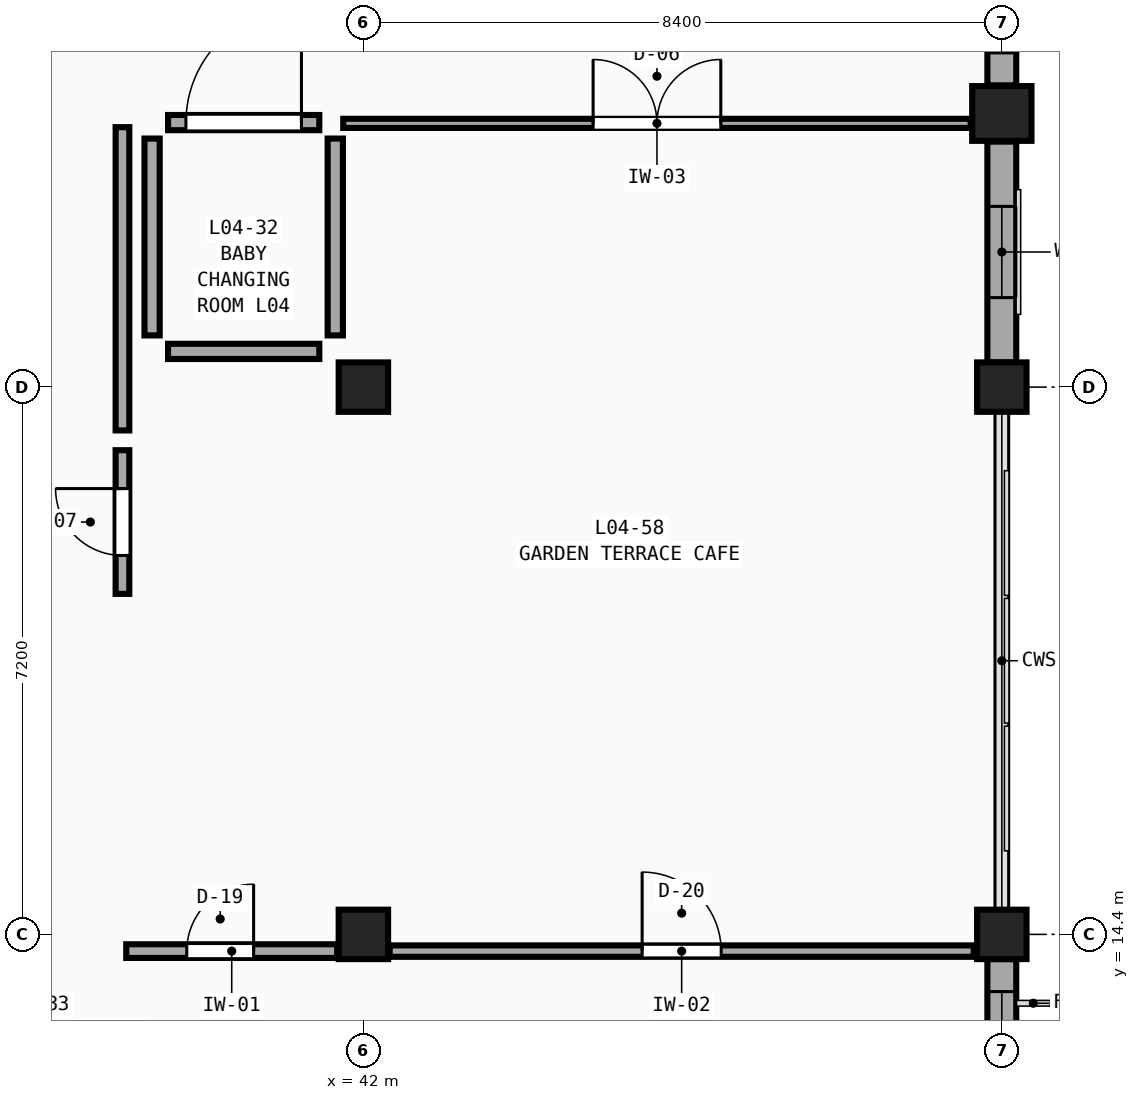
"""IFC4 building model, lengths in metres.
Left out: names, types, materials, properties, quantities, classifications, styles, units other than length and angle.
Written with IfcOpenShell. Run it as: python <this file> out.ifc"""

import sys

from ifc_helpers import new_model, si_unit, direction, frame, frame_2d, origin, origin_2d, place, context, subcontext, project, spatial, rectangle, extrude, element, fill, save


model = new_model("IFC4")
c1 = context("Model", 3, precision=1e-05, world=origin(), true_north=direction((0.0, 1.0)))
c2 = subcontext(c1, "Body", "Model", "MODEL_VIEW")
j1 = project(units=[si_unit("LENGTHUNIT", "METRE"), si_unit("PLANEANGLEUNIT", "RADIAN")], contexts=[c1])
p1 = place(None, origin())
s1 = spatial("IfcSite", under=j1, at=p1, CompositionType="ELEMENT")
p2 = place(p1, origin())
s2 = spatial("IfcBuilding", under=s1, at=p2, CompositionType="ELEMENT")
p3 = place(p2, frame((0.0, 0.0, 18.9)))
s3 = spatial("IfcBuildingStorey", under=s2, at=p3, CompositionType="ELEMENT", Elevation=18.9)
for number, where, z_axis, x_axis in (
    (1, (42.0, 14.4, 0.0), (0.0, 0.0, 1.0), (1.0, 0.0, 0.0)),
    (2, (42.0, 21.6, 0.0), (0.0, 0.0, 1.0), (1.0, 0.0, 0.0)),
    (3, (50.4, 14.4, 0.0), (0.0, 0.0, 1.0), (1.0, 0.0, 0.0)),
    (4, (50.4, 21.6, 0.0), (0.0, 0.0, 1.0), (1.0, 0.0, 0.0)),
):
    element("IfcColumn", number, at=place(p3, frame(where, z_axis=z_axis, x_axis=x_axis)), inside=s3, PredefinedType="COLUMN", context=c2, shape_type="SweptSolid", body=[
        extrude(rectangle(XDim=0.65, YDim=0.65, at=origin_2d()), origin(), (0.0, 0.0, 1.0), 4.5),
    ])
p4 = place(p3, frame((50.4, 25.2, 0.0), z_axis=(0.0, 0.0, 1.0), x_axis=(1.0, 0.0, 0.0)))
e5 = element("IfcColumn", 5, at=p4, inside=s3, PredefinedType="PILASTER", context=c2, shape_type="SweptSolid", body=[
    extrude(rectangle(XDim=0.78, YDim=0.72, at=origin_2d()), origin(), (0.0, 0.0, 1.0), 4.5),
])
p5 = place(p3, frame((50.4, 14.075, 0.0), z_axis=(0.0, 0.0, 1.0), x_axis=(0.0, -1.0, 0.0)))
e6 = element("IfcWall", 6, at=p5, inside=s3, PredefinedType="SOLIDWALL", context=c2, shape_type="SweptSolid", body=[
    extrude(rectangle(XDim=2.905, YDim=0.38, at=frame_2d((1.453, 0.0))), origin(), (0.0, 0.0, 1.0), 3.63),
])
p6 = place(p5, frame((0.427, 0.0, 0.75)))
e7 = element("IfcOpeningElement", 7, at=p6, cuts=e6, PredefinedType="OPENING", context=c2, shape_type="SweptSolid", body=[
    extrude(rectangle(XDim=2.05, YDim=2.08, at=frame_2d((1.025, 1.04))), frame((0.0, 0.21, 0.0), z_axis=(0.0, -1.0, 0.0), x_axis=(1.0, 0.0, 0.0)), (0.0, 0.0, 1.0), 0.42),
])
p7 = place(p3, frame((50.4, 28.475, 0.0), z_axis=(0.0, 0.0, 1.0), x_axis=(0.0, -1.0, 0.0)))
e8 = element("IfcWall", 8, at=p7, inside=s3, PredefinedType="SOLIDWALL", context=c2, shape_type="SweptSolid", body=[
    extrude(rectangle(XDim=2.905, YDim=0.38, at=frame_2d((1.453, 0.0))), origin(), (0.0, 0.0, 1.0), 3.63),
])
p8 = place(p7, frame((0.427, 0.0, 0.75)))
e9 = element("IfcOpeningElement", 9, at=p8, cuts=e8, PredefinedType="OPENING", context=c2, shape_type="SweptSolid", body=[
    extrude(rectangle(XDim=2.05, YDim=2.08, at=frame_2d((1.025, 1.04))), frame((0.0, 0.21, 0.0), z_axis=(0.0, -1.0, 0.0), x_axis=(1.0, 0.0, 0.0)), (0.0, 0.0, 1.0), 0.42),
])
p9 = place(p3, frame((50.4, 24.83, 0.0), z_axis=(0.0, 0.0, 1.0), x_axis=(0.0, -1.0, 0.0)))
e10 = element("IfcWall", 10, at=p9, inside=s3, PredefinedType="SOLIDWALL", context=c2, shape_type="SweptSolid", body=[
    extrude(rectangle(XDim=2.905, YDim=0.38, at=frame_2d((1.453, 0.0))), origin(), (0.0, 0.0, 1.0), 3.63),
])
p10 = place(p9, frame((0.853, 0.0, 0.75)))
e11 = element("IfcOpeningElement", 11, at=p10, cuts=e10, PredefinedType="OPENING", context=c2, shape_type="SweptSolid", body=[
    extrude(rectangle(XDim=1.2, YDim=2.26, at=frame_2d((0.6, 1.13))), frame((0.0, 0.21, 0.0), z_axis=(0.0, -1.0, 0.0), x_axis=(1.0, 0.0, 0.0)), (0.0, 0.0, 1.0), 0.42),
])
p11 = place(p3, frame((38.88, 14.18, 0.0), z_axis=(0.0, 0.0, 1.0), x_axis=(1.0, 0.0, 0.0)))
e12 = element("IfcWall", 12, at=p11, inside=s3, PredefinedType="PARTITIONING", context=c2, shape_type="SweptSolid", body=[
    extrude(rectangle(XDim=2.775, YDim=0.18, at=frame_2d((1.388, 0.0))), origin(), (0.0, 0.0, 1.0), 3.73),
])
p12 = place(p11, frame((0.796, 0.0, 0.0)))
e13 = element("IfcOpeningElement", 13, at=p12, cuts=e12, PredefinedType="OPENING", context=c2, shape_type="SweptSolid", body=[
    extrude(rectangle(XDim=0.88, YDim=2.29, at=frame_2d((0.44, 1.145))), frame((0.0, 0.11, 0.0), z_axis=(0.0, -1.0, 0.0), x_axis=(1.0, 0.0, 0.0)), (0.0, 0.0, 1.0), 0.22),
])
p13 = place(p3, frame((42.345, 14.18, 0.0), z_axis=(0.0, 0.0, 1.0), x_axis=(1.0, 0.0, 0.0)))
e14 = element("IfcWall", 14, at=p13, inside=s3, PredefinedType="PARTITIONING", context=c2, shape_type="SweptSolid", body=[
    extrude(rectangle(XDim=7.685, YDim=0.15, at=frame_2d((3.843, 0.0))), origin(), (0.0, 0.0, 1.0), 3.73),
])
p14 = place(p13, frame((3.323, 0.0, 0.0)))
e15 = element("IfcOpeningElement", 15, at=p14, cuts=e14, PredefinedType="OPENING", context=c2, shape_type="SweptSolid", body=[
    extrude(rectangle(XDim=1.04, YDim=2.29, at=frame_2d((0.52, 1.145))), frame((0.0, 0.095, 0.0), z_axis=(0.0, -1.0, 0.0), x_axis=(1.0, 0.0, 0.0)), (0.0, 0.0, 1.0), 0.19),
])
p15 = place(p3, frame((41.735, 25.07, 0.0), z_axis=(0.0, 0.0, 1.0), x_axis=(1.0, 0.0, 0.0)))
e16 = element("IfcWall", 16, at=p15, inside=s3, PredefinedType="PARTITIONING", context=c2, shape_type="SweptSolid", body=[
    extrude(rectangle(XDim=8.255, YDim=0.12, at=frame_2d((4.127, 0.0))), origin(), (0.0, 0.0, 1.0), 4.18),
])
p16 = place(p15, frame((3.288, 0.0, 0.0)))
e17 = element("IfcOpeningElement", 17, at=p16, cuts=e16, PredefinedType="OPENING", context=c2, shape_type="SweptSolid", body=[
    extrude(rectangle(XDim=1.68, YDim=2.05, at=frame_2d((0.84, 1.025))), frame((0.0, 0.08, 0.0), z_axis=(0.0, -1.0, 0.0), x_axis=(1.0, 0.0, 0.0)), (0.0, 0.0, 1.0), 0.16),
])
p17 = place(p3, frame((38.83, 21.03, 0.0), z_axis=(0.0, 0.0, 1.0), x_axis=(0.0, 1.0, 0.0)))
e18 = element("IfcWall", 18, at=p17, inside=s3, PredefinedType="PARTITIONING", context=c2, shape_type="SweptSolid", body=[
    extrude(rectangle(XDim=3.99, YDim=0.18, at=frame_2d((1.995, 0.0))), origin(), (0.0, 0.0, 1.0), 4.18),
])
p18 = place(p3, frame((39.43, 25.08, 0.0), z_axis=(0.0, 0.0, 1.0), x_axis=(1.0, 0.0, 0.0)))
e19 = element("IfcWall", 19, at=p18, inside=s3, PredefinedType="PLUMBINGWALL", context=c2, shape_type="SweptSolid", body=[
    extrude(rectangle(XDim=1.99, YDim=0.2, at=frame_2d((0.995, 0.0))), origin(), (0.0, 0.0, 1.0), 4.18),
])
p19 = place(p18, frame((0.235, 0.0, 0.0)))
e20 = element("IfcOpeningElement", 20, at=p19, cuts=e19, PredefinedType="OPENING", context=c2, shape_type="SweptSolid", body=[
    extrude(rectangle(XDim=1.52, YDim=2.05, at=frame_2d((0.76, 1.025))), frame((0.0, 0.12, 0.0), z_axis=(0.0, -1.0, 0.0), x_axis=(1.0, 0.0, 0.0)), (0.0, 0.0, 1.0), 0.24),
])
p20 = place(p3, frame((38.83, 18.88, 0.0), z_axis=(0.0, 0.0, 1.0), x_axis=(0.0, 1.0, 0.0)))
e21 = element("IfcWall", 21, at=p20, inside=s3, PredefinedType="PARTITIONING", context=c2, shape_type="SweptSolid", body=[
    extrude(rectangle(XDim=1.89, YDim=0.18, at=frame_2d((0.945, 0.0))), origin(), (0.0, 0.0, 1.0), 4.18),
])
p21 = place(p20, frame((0.505, 0.0, 0.0)))
e22 = element("IfcOpeningElement", 22, at=p21, cuts=e21, PredefinedType="OPENING", context=c2, shape_type="SweptSolid", body=[
    extrude(rectangle(XDim=0.88, YDim=2.13, at=frame_2d((0.44, 1.065))), frame((0.0, 0.11, 0.0), z_axis=(0.0, -1.0, 0.0), x_axis=(1.0, 0.0, 0.0)), (0.0, 0.0, 1.0), 0.22),
])
p22 = place(p3, frame((41.63, 22.28, 0.0), z_axis=(0.0, 0.0, 1.0), x_axis=(0.0, 1.0, 0.0)))
e23 = element("IfcWall", 23, at=p22, inside=s3, PredefinedType="PLUMBINGWALL", context=c2, shape_type="SweptSolid", body=[
    extrude(rectangle(XDim=2.59, YDim=0.2, at=frame_2d((1.295, 0.0))), origin(), (0.0, 0.0, 1.0), 3.73),
])
p23 = place(p3, frame((39.22, 22.28, 0.0), z_axis=(0.0, 0.0, 1.0), x_axis=(0.0, 1.0, 0.0)))
e24 = element("IfcWall", 24, at=p23, inside=s3, PredefinedType="PLUMBINGWALL", context=c2, shape_type="SweptSolid", body=[
    extrude(rectangle(XDim=2.59, YDim=0.2, at=frame_2d((1.295, 0.0))), origin(), (0.0, 0.0, 1.0), 4.18),
])
p24 = place(p3, frame((39.43, 22.07, 0.0), z_axis=(0.0, 0.0, 1.0), x_axis=(1.0, 0.0, 0.0)))
e25 = element("IfcWall", 25, at=p24, inside=s3, PredefinedType="PLUMBINGWALL", context=c2, shape_type="SweptSolid", body=[
    extrude(rectangle(XDim=1.99, YDim=0.2, at=frame_2d((0.995, 0.0))), origin(), (0.0, 0.0, 1.0), 3.73),
])
p25 = place(p6, origin())
e26 = element("IfcWindow", 26, at=p25, inside=s3, PartitioningType="TRIPLE_PANEL_VERTICAL", PredefinedType="WINDOW", context=c2, shape_type="SweptSolid", body=[
    extrude(rectangle(XDim=2.05, YDim=2.08, at=frame_2d((1.025, 1.04))), frame((0.0, 0.03, 0.0), z_axis=(0.0, -1.0, 0.0), x_axis=(1.0, 0.0, 0.0)), (0.0, 0.0, 1.0), 0.06),
])
fill(e7, e26)
p26 = place(p8, origin())
e27 = element("IfcWindow", 27, at=p26, inside=s3, PartitioningType="TRIPLE_PANEL_VERTICAL", PredefinedType="WINDOW", context=c2, shape_type="SweptSolid", body=[
    extrude(rectangle(XDim=2.05, YDim=2.08, at=frame_2d((1.025, 1.04))), frame((0.0, 0.03, 0.0), z_axis=(0.0, -1.0, 0.0), x_axis=(1.0, 0.0, 0.0)), (0.0, 0.0, 1.0), 0.06),
])
fill(e9, e27)
p27 = place(p10, origin())
e28 = element("IfcWindow", 28, at=p27, inside=s3, PartitioningType="SINGLE_PANEL", PredefinedType="WINDOW", context=c2, shape_type="SweptSolid", body=[
    extrude(rectangle(XDim=1.2, YDim=2.26, at=frame_2d((0.6, 1.13))), frame((0.0, 0.03, 0.0), z_axis=(0.0, -1.0, 0.0), x_axis=(1.0, 0.0, 0.0)), (0.0, 0.0, 1.0), 0.06),
])
fill(e11, e28)
p28 = place(p12, origin())
e29 = element("IfcDoor", 29, at=p28, inside=s3, OperationType="SINGLE_SWING_RIGHT", PredefinedType="DOOR", context=c2, shape_type="SweptSolid", body=[
    extrude(rectangle(XDim=0.88, YDim=2.29, at=frame_2d((0.44, 1.145))), frame((0.0, 0.025, 0.0), z_axis=(0.0, -1.0, 0.0), x_axis=(1.0, 0.0, 0.0)), (0.0, 0.0, 1.0), 0.05),
])
fill(e13, e29)
p29 = place(p14, origin())
e30 = element("IfcDoor", 30, at=p29, inside=s3, OperationType="SINGLE_SWING_LEFT", PredefinedType="DOOR", context=c2, shape_type="SweptSolid", body=[
    extrude(rectangle(XDim=1.04, YDim=2.29, at=frame_2d((0.52, 1.145))), frame((0.0, 0.025, 0.0), z_axis=(0.0, -1.0, 0.0), x_axis=(1.0, 0.0, 0.0)), (0.0, 0.0, 1.0), 0.05),
])
fill(e15, e30)
p30 = place(p16, origin())
e31 = element("IfcDoor", 31, at=p30, inside=s3, OperationType="DOUBLE_DOOR_SINGLE_SWING", PredefinedType="DOOR", context=c2, shape_type="SweptSolid", body=[
    extrude(rectangle(XDim=1.68, YDim=2.05, at=frame_2d((0.84, 1.025))), frame((0.0, 0.025, 0.0), z_axis=(0.0, -1.0, 0.0), x_axis=(1.0, 0.0, 0.0)), (0.0, 0.0, 1.0), 0.05),
])
fill(e17, e31)
p31 = place(p19, origin())
e32 = element("IfcDoor", 32, at=p31, inside=s3, OperationType="SINGLE_SWING_RIGHT", PredefinedType="DOOR", context=c2, shape_type="SweptSolid", body=[
    extrude(rectangle(XDim=1.52, YDim=2.05, at=frame_2d((0.76, 1.025))), frame((0.0, 0.025, 0.0), z_axis=(0.0, -1.0, 0.0), x_axis=(1.0, 0.0, 0.0)), (0.0, 0.0, 1.0), 0.05),
])
fill(e20, e32)
p32 = place(p21, origin())
e33 = element("IfcDoor", 33, at=p32, inside=s3, OperationType="SINGLE_SWING_RIGHT", PredefinedType="DOOR", context=c2, shape_type="SweptSolid", body=[
    extrude(rectangle(XDim=0.88, YDim=2.13, at=frame_2d((0.44, 1.065))), frame((0.0, 0.025, 0.0), z_axis=(0.0, -1.0, 0.0), x_axis=(1.0, 0.0, 0.0)), (0.0, 0.0, 1.0), 0.05),
])
fill(e22, e33)
save(model, sys.argv[1])
